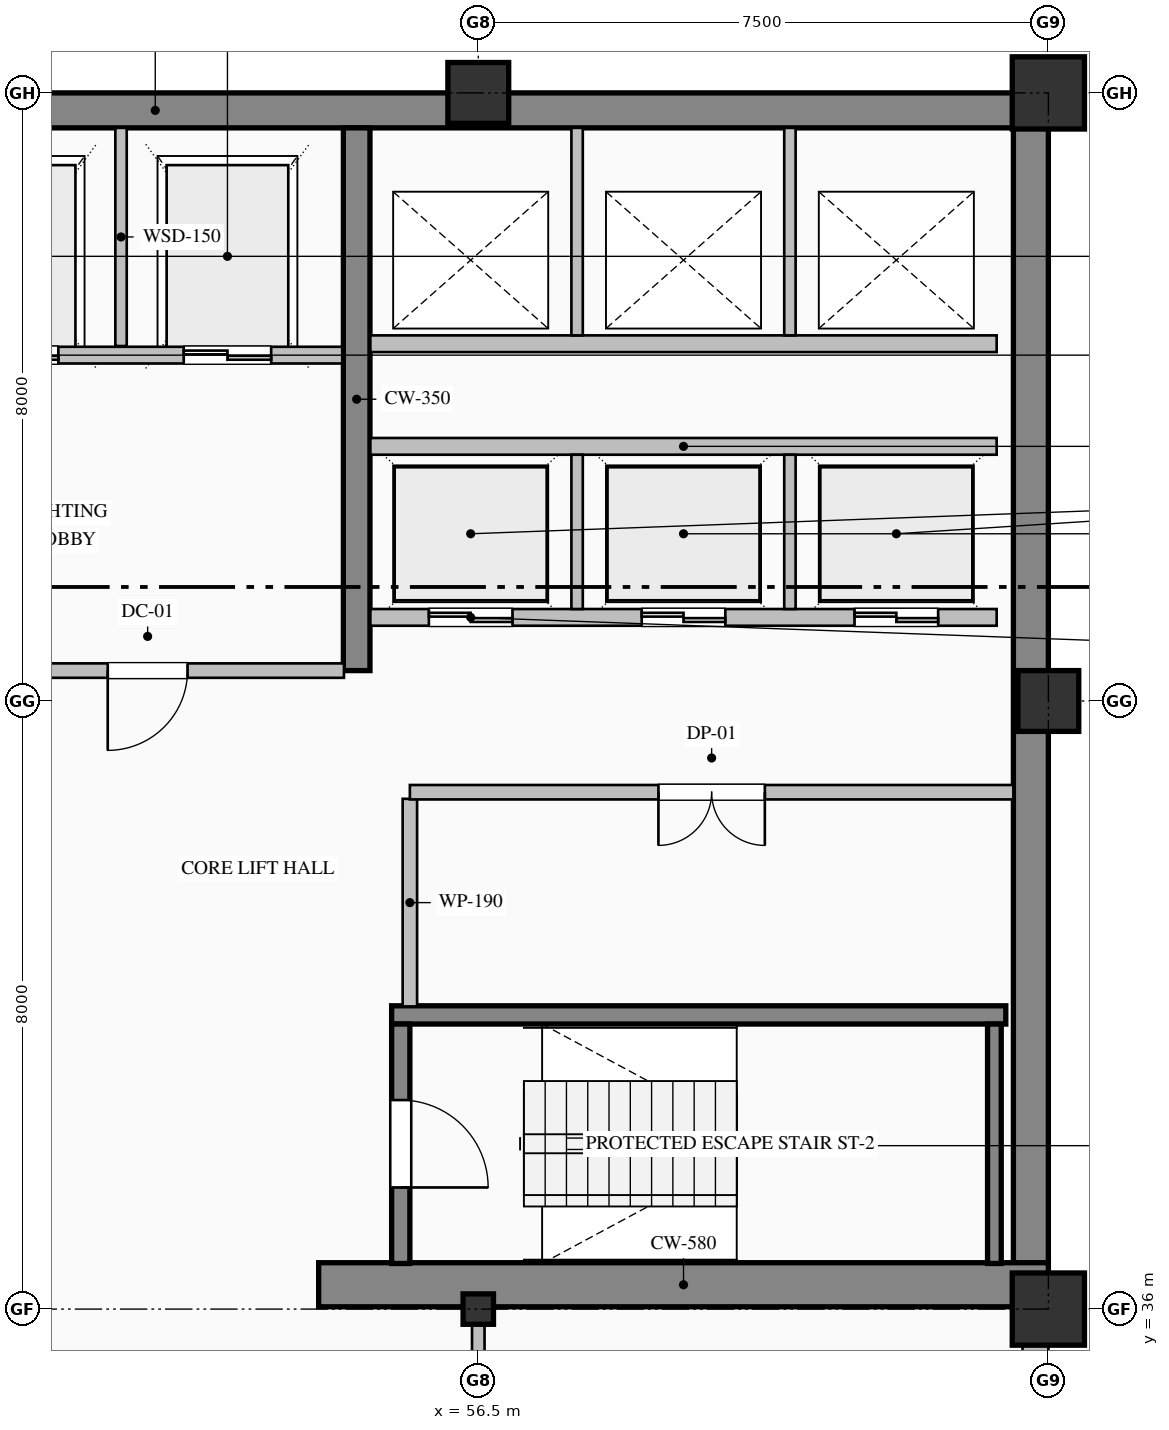
"""IFC4 building model, lengths in metres.
Left out: names, types, materials, properties, quantities, classifications, styles, units other than length and angle.
Written with IfcOpenShell. Run it as: python <this file> out.ifc"""

import sys

from ifc_helpers import new_model, si_unit, direction, frame, frame_2d, origin, origin_2d, place, context, subcontext, project, spatial, rectangle, hollow_rectangle, i_section, extrude, element, fill, save


model = new_model("IFC4")
c1 = context("Model", 3, precision=1e-05, world=origin(), true_north=direction((0.0, 1.0)))
c2 = subcontext(c1, "Body", "Model", "MODEL_VIEW")
j1 = project(units=[si_unit("LENGTHUNIT", "METRE"), si_unit("PLANEANGLEUNIT", "RADIAN")], contexts=[c1])
p1 = place(None, origin())
s1 = spatial("IfcSite", under=j1, at=p1, CompositionType="ELEMENT")
p2 = place(p1, origin())
s2 = spatial("IfcBuilding", under=s1, at=p2, CompositionType="ELEMENT")
p3 = place(p2, frame((0.0, 0.0, 221.8)))
s3 = spatial("IfcBuildingStorey", under=s2, at=p3, CompositionType="ELEMENT", Elevation=221.8)
p4 = place(p3, frame((40.5, 51.77, 0.0), z_axis=(0.0, 0.0, 1.0), x_axis=(1.0, 0.0, 0.0)))
e1 = element("IfcWall", 1, at=p4, inside=s3, PredefinedType="SHEAR", context=c2, shape_type="SweptSolid", body=[
    extrude(rectangle(XDim=23.5, YDim=0.46, at=frame_2d((11.75, 0.0))), origin(), (0.0, 0.0, 1.0), 3.775),
])
p5 = place(p3, frame((63.77, 36.32, 0.0), z_axis=(0.0, 0.0, 1.0), x_axis=(0.0, 1.0, 0.0)))
e2 = element("IfcWall", 2, at=p5, inside=s3, PredefinedType="SHEAR", context=c2, shape_type="SweptSolid", body=[
    extrude(rectangle(XDim=15.22, YDim=0.46, at=frame_2d((7.61, 0.0))), origin(), (0.0, 0.0, 1.0), 3.775),
])
p6 = place(p3, frame((54.4, 36.32, 0.0), z_axis=(0.0, 0.0, 1.0), x_axis=(1.0, 0.0, 0.0)))
e3 = element("IfcWall", 3, at=p6, inside=s3, PredefinedType="SHEAR", context=c2, shape_type="SweptSolid", body=[
    extrude(rectangle(XDim=9.6, YDim=0.58, at=frame_2d((4.8, 0.0))), origin(), (0.0, 0.0, 1.0), 4.0),
])
p7 = place(p3, frame((54.9, 44.4, 0.0), z_axis=(0.0, 0.0, 1.0), x_axis=(0.0, 1.0, 0.0)))
e4 = element("IfcWall", 4, at=p7, inside=s3, PredefinedType="SHEAR", context=c2, shape_type="SweptSolid", body=[
    extrude(rectangle(XDim=7.14, YDim=0.35, at=frame_2d((3.57, 0.0))), origin(), (0.0, 0.0, 1.0), 3.775),
])
p8 = place(p3, frame((56.5, 36.0, 0.0), z_axis=(0.0, 0.0, 1.0), x_axis=(1.0, 0.0, 0.0)))
e5 = element("IfcColumn", 5, at=p8, inside=s3, PredefinedType="COLUMN", context=c2, shape_type="SweptSolid", body=[
    extrude(i_section(OverallWidth=0.4, OverallDepth=0.4, WebThickness=0.013, FlangeThickness=0.021, FilletRadius=0.022, at=origin_2d()), origin(), (0.0, 0.0, 1.0), 4.0),
])
p9 = place(p3, frame((56.5, 52.0, 0.0), z_axis=(0.0, 0.0, 1.0), x_axis=(1.0, 0.0, 0.0)))
e6 = element("IfcColumn", 6, at=p9, inside=s3, PredefinedType="COLUMN", context=c2, shape_type="SweptSolid", body=[
    extrude(hollow_rectangle(XDim=0.8, YDim=0.8, WallThickness=0.032, at=origin_2d()), origin(), (0.0, 0.0, 1.0), 4.0),
])
p10 = place(p3, frame((64.0, 36.0, 0.0), z_axis=(0.0, 0.0, 1.0), x_axis=(1.0, 0.0, 0.0)))
e7 = element("IfcColumn", 7, at=p10, inside=s3, PredefinedType="COLUMN", context=c2, shape_type="SweptSolid", body=[
    extrude(hollow_rectangle(XDim=0.95, YDim=0.95, WallThickness=0.036, at=origin_2d()), origin(), (0.0, 0.0, 1.0), 4.0),
])
p11 = place(p3, frame((64.0, 44.0, 0.0), z_axis=(0.0, 0.0, 1.0), x_axis=(1.0, 0.0, 0.0)))
e8 = element("IfcColumn", 8, at=p11, inside=s3, PredefinedType="COLUMN", context=c2, shape_type="SweptSolid", body=[
    extrude(hollow_rectangle(XDim=0.8, YDim=0.8, WallThickness=0.032, at=origin_2d()), origin(), (0.0, 0.0, 1.0), 4.0),
])
p12 = place(p3, frame((64.0, 52.0, 0.0), z_axis=(0.0, 0.0, 1.0), x_axis=(1.0, 0.0, 0.0)))
e9 = element("IfcColumn", 9, at=p12, inside=s3, PredefinedType="COLUMN", context=c2, shape_type="SweptSolid", body=[
    extrude(hollow_rectangle(XDim=0.95, YDim=0.95, WallThickness=0.036, at=origin_2d()), origin(), (0.0, 0.0, 1.0), 4.0),
])
p13 = place(p3, frame((63.83, 36.05, 0.0), z_axis=(0.0, 0.0, 1.0), x_axis=(0.0, -1.0, 0.0)))
e10 = element("IfcWall", 10, at=p13, inside=s3, PredefinedType="SOLIDWALL", context=c2, shape_type="SweptSolid", body=[
    extrude(rectangle(XDim=19.55, YDim=0.34, at=frame_2d((9.775, 0.0))), origin(), (0.0, 0.0, 1.0), 3.325),
])
p14 = place(p13, frame((2.85, 0.0, 0.7)))
e11 = element("IfcOpeningElement", 11, at=p14, cuts=e10, PredefinedType="OPENING", context=c2, shape_type="SweptSolid", body=[
    extrude(rectangle(XDim=1.5, YDim=2.4, at=frame_2d((0.75, 1.2))), frame((0.0, 0.18, 0.0), z_axis=(0.0, -1.0, 0.0), x_axis=(1.0, 0.0, 0.0)), (0.0, 0.0, 1.0), 0.36),
])
p15 = place(p13, frame((10.125, 0.0, 0.9)))
e12 = element("IfcOpeningElement", 12, at=p15, cuts=e10, PredefinedType="OPENING", context=c2, shape_type="SweptSolid", body=[
    extrude(rectangle(XDim=1.35, YDim=1.85, at=frame_2d((0.675, 0.925))), frame((0.0, 0.18, 0.0), z_axis=(0.0, -1.0, 0.0), x_axis=(1.0, 0.0, 0.0)), (0.0, 0.0, 1.0), 0.36),
])
p16 = place(p13, frame((13.65, 0.0, 0.7)))
e13 = element("IfcOpeningElement", 13, at=p16, cuts=e10, PredefinedType="OPENING", context=c2, shape_type="SweptSolid", body=[
    extrude(rectangle(XDim=1.5, YDim=2.4, at=frame_2d((0.75, 1.2))), frame((0.0, 0.18, 0.0), z_axis=(0.0, -1.0, 0.0), x_axis=(1.0, 0.0, 0.0)), (0.0, 0.0, 1.0), 0.36),
])
p17 = place(p3, frame((55.36, 39.87, 0.0), z_axis=(0.0, 0.0, 1.0), x_axis=(1.0, 0.0, 0.0)))
e14 = element("IfcWall", 14, at=p17, inside=s3, PredefinedType="SOLIDWALL", context=c2, shape_type="SweptSolid", body=[
    extrude(rectangle(XDim=8.08, YDim=0.24, at=frame_2d((4.04, 0.0))), origin(), (0.0, 0.0, 1.0), 4.0),
])
p18 = place(p3, frame((55.48, 39.75, 0.0), z_axis=(0.0, 0.0, 1.0), x_axis=(0.0, -1.0, 0.0)))
e15 = element("IfcWall", 15, at=p18, inside=s3, PredefinedType="SOLIDWALL", context=c2, shape_type="SweptSolid", body=[
    extrude(rectangle(XDim=3.15, YDim=0.24, at=frame_2d((1.575, 0.0))), origin(), (0.0, 0.0, 1.0), 4.0),
])
p19 = place(p18, frame((1.0, 0.0, 0.0)))
e16 = element("IfcOpeningElement", 16, at=p19, cuts=e15, PredefinedType="OPENING", context=c2, shape_type="SweptSolid", body=[
    extrude(rectangle(XDim=1.15, YDim=2.2, at=frame_2d((0.575, 1.1))), frame((0.0, 0.13, 0.0), z_axis=(0.0, -1.0, 0.0), x_axis=(1.0, 0.0, 0.0)), (0.0, 0.0, 1.0), 0.26),
])
p20 = place(p3, frame((63.29, 36.6, 0.0), z_axis=(0.0, 0.0, 1.0), x_axis=(0.0, 1.0, 0.0)))
e17 = element("IfcWall", 17, at=p20, inside=s3, PredefinedType="SOLIDWALL", context=c2, shape_type="SweptSolid", body=[
    extrude(rectangle(XDim=3.15, YDim=0.18, at=frame_2d((1.575, 0.0))), origin(), (0.0, 0.0, 1.0), 4.0),
])
p21 = place(p3, frame((54.71, 48.55, 0.0), z_axis=(0.0, 0.0, 1.0), x_axis=(-1.0, 0.0, 0.0)))
e18 = element("IfcWall", 18, at=p21, inside=s3, PredefinedType="PARTITIONING", context=c2, shape_type="SweptSolid", body=[
    extrude(rectangle(XDim=5.12, YDim=0.22, at=frame_2d((2.56, 0.0))), origin(), (0.0, 0.0, 1.0), 3.775),
])
p22 = place(p21, frame((3.735, 0.0, 0.0)))
e19 = element("IfcOpeningElement", 19, at=p22, cuts=e18, PredefinedType="OPENING", context=c2, shape_type="SweptSolid", body=[
    extrude(rectangle(XDim=1.15, YDim=2.2, at=frame_2d((0.575, 1.1))), frame((0.0, 0.12, 0.0), z_axis=(0.0, -1.0, 0.0), x_axis=(1.0, 0.0, 0.0)), (0.0, 0.0, 1.0), 0.24),
])
p23 = place(p21, frame((0.935, 0.0, 0.0)))
e20 = element("IfcOpeningElement", 20, at=p23, cuts=e18, PredefinedType="OPENING", context=c2, shape_type="SweptSolid", body=[
    extrude(rectangle(XDim=1.15, YDim=2.2, at=frame_2d((0.575, 1.1))), frame((0.0, 0.12, 0.0), z_axis=(0.0, -1.0, 0.0), x_axis=(1.0, 0.0, 0.0)), (0.0, 0.0, 1.0), 0.24),
])
p24 = place(p3, frame((51.8, 48.67, 0.0), z_axis=(0.0, 0.0, 1.0), x_axis=(0.0, 1.0, 0.0)))
e21 = element("IfcWall", 21, at=p24, inside=s3, PredefinedType="PARTITIONING", context=c2, shape_type="SweptSolid", body=[
    extrude(rectangle(XDim=2.87, YDim=0.15, at=frame_2d((1.435, 0.0))), origin(), (0.0, 0.0, 1.0), 3.775),
])
p25 = place(p3, frame((63.32, 45.1, 0.0), z_axis=(0.0, 0.0, 1.0), x_axis=(-1.0, 0.0, 0.0)))
e22 = element("IfcWall", 22, at=p25, inside=s3, PredefinedType="PARTITIONING", context=c2, shape_type="SweptSolid", body=[
    extrude(rectangle(XDim=8.24, YDim=0.22, at=frame_2d((4.12, 0.0))), origin(), (0.0, 0.0, 1.0), 3.775),
])
p26 = place(p25, frame((6.37, 0.0, 0.0)))
e23 = element("IfcOpeningElement", 23, at=p26, cuts=e22, PredefinedType="OPENING", context=c2, shape_type="SweptSolid", body=[
    extrude(rectangle(XDim=1.1, YDim=2.2, at=frame_2d((0.55, 1.1))), frame((0.0, 0.12, 0.0), z_axis=(0.0, -1.0, 0.0), x_axis=(1.0, 0.0, 0.0)), (0.0, 0.0, 1.0), 0.24),
])
p27 = place(p25, frame((3.57, 0.0, 0.0)))
e24 = element("IfcOpeningElement", 24, at=p27, cuts=e22, PredefinedType="OPENING", context=c2, shape_type="SweptSolid", body=[
    extrude(rectangle(XDim=1.1, YDim=2.2, at=frame_2d((0.55, 1.1))), frame((0.0, 0.12, 0.0), z_axis=(0.0, -1.0, 0.0), x_axis=(1.0, 0.0, 0.0)), (0.0, 0.0, 1.0), 0.24),
])
p28 = place(p25, frame((0.77, 0.0, 0.0)))
e25 = element("IfcOpeningElement", 25, at=p28, cuts=e22, PredefinedType="OPENING", context=c2, shape_type="SweptSolid", body=[
    extrude(rectangle(XDim=1.1, YDim=2.2, at=frame_2d((0.55, 1.1))), frame((0.0, 0.12, 0.0), z_axis=(0.0, -1.0, 0.0), x_axis=(1.0, 0.0, 0.0)), (0.0, 0.0, 1.0), 0.24),
])
p29 = place(p3, frame((55.08, 47.35, 0.0), z_axis=(0.0, 0.0, 1.0), x_axis=(1.0, 0.0, 0.0)))
e26 = element("IfcWall", 26, at=p29, inside=s3, PredefinedType="PARTITIONING", context=c2, shape_type="SweptSolid", body=[
    extrude(rectangle(XDim=8.24, YDim=0.22, at=frame_2d((4.12, 0.0))), origin(), (0.0, 0.0, 1.0), 3.775),
])
for number, where, z_axis, x_axis in (
    (27, (57.8, 45.21, 0.0), (0.0, 0.0, 1.0), (0.0, 1.0, 0.0)),
    (28, (60.6, 45.21, 0.0), (0.0, 0.0, 1.0), (0.0, 1.0, 0.0)),
):
    element("IfcWall", number, at=place(p3, frame(where, z_axis=z_axis, x_axis=x_axis)), inside=s3, PredefinedType="PARTITIONING", context=c2, shape_type="SweptSolid", body=[
        extrude(rectangle(XDim=2.03, YDim=0.15, at=frame_2d((1.015, 0.0))), origin(), (0.0, 0.0, 1.0), 3.775),
    ])
p30 = place(p3, frame((63.32, 48.7, 0.0), z_axis=(0.0, 0.0, 1.0), x_axis=(-1.0, 0.0, 0.0)))
e29 = element("IfcWall", 29, at=p30, inside=s3, PredefinedType="PARTITIONING", context=c2, shape_type="SweptSolid", body=[
    extrude(rectangle(XDim=8.24, YDim=0.22, at=frame_2d((4.12, 0.0))), origin(), (0.0, 0.0, 1.0), 3.775),
])
for number, where, z_axis, x_axis in (
    (30, (57.8, 48.81, 0.0), (0.0, 0.0, 1.0), (0.0, 1.0, 0.0)),
    (31, (60.6, 48.81, 0.0), (0.0, 0.0, 1.0), (0.0, 1.0, 0.0)),
):
    element("IfcWall", number, at=place(p3, frame(where, z_axis=z_axis, x_axis=x_axis)), inside=s3, PredefinedType="PARTITIONING", context=c2, shape_type="SweptSolid", body=[
        extrude(rectangle(XDim=2.73, YDim=0.15, at=frame_2d((1.365, 0.0))), origin(), (0.0, 0.0, 1.0), 3.775),
    ])
p31 = place(p3, frame((54.733, 44.4, 0.0), z_axis=(0.0, 0.0, 1.0), x_axis=(-1.0, 0.0, 0.0)))
e32 = element("IfcWall", 32, at=p31, inside=s3, PredefinedType="PARTITIONING", context=c2, shape_type="SweptSolid", body=[
    extrude(rectangle(XDim=5.166, YDim=0.19, at=frame_2d((2.583, 0.0))), origin(), (0.0, 0.0, 1.0), 3.775),
])
p32 = place(p31, frame((2.058, 0.0, 0.0)))
e33 = element("IfcOpeningElement", 33, at=p32, cuts=e32, PredefinedType="OPENING", context=c2, shape_type="SweptSolid", body=[
    extrude(rectangle(XDim=1.05, YDim=2.15, at=frame_2d((0.525, 1.075))), frame((0.0, 0.105, 0.0), z_axis=(0.0, -1.0, 0.0), x_axis=(1.0, 0.0, 0.0)), (0.0, 0.0, 1.0), 0.21),
])
p33 = place(p3, frame((55.6, 42.713, 0.0), z_axis=(0.0, 0.0, 1.0), x_axis=(0.0, -1.0, 0.0)))
e34 = element("IfcWall", 34, at=p33, inside=s3, PredefinedType="PARTITIONING", context=c2, shape_type="SweptSolid", body=[
    extrude(rectangle(XDim=2.731, YDim=0.19, at=frame_2d((1.365, 0.0))), origin(), (0.0, 0.0, 1.0), 3.775),
])
p34 = place(p3, frame((63.54, 42.8, 0.0), z_axis=(0.0, 0.0, 1.0), x_axis=(-1.0, 0.0, 0.0)))
e35 = element("IfcWall", 35, at=p34, inside=s3, PredefinedType="PARTITIONING", context=c2, shape_type="SweptSolid", body=[
    extrude(rectangle(XDim=7.94, YDim=0.19, at=frame_2d((3.97, 0.0))), origin(), (0.0, 0.0, 1.0), 3.775),
])
p35 = place(p34, frame((3.27, 0.0, 0.0)))
e36 = element("IfcOpeningElement", 36, at=p35, cuts=e35, PredefinedType="OPENING", context=c2, shape_type="SweptSolid", body=[
    extrude(rectangle(XDim=1.4, YDim=2.25, at=frame_2d((0.7, 1.125))), frame((0.0, 0.105, 0.0), z_axis=(0.0, -1.0, 0.0), x_axis=(1.0, 0.0, 0.0)), (0.0, 0.0, 1.0), 0.21),
])
p36 = place(p3, frame((56.5, 36.0, 0.0), z_axis=(0.0, 0.0, 1.0), x_axis=(0.0, -1.0, 0.0)))
e37 = element("IfcWall", 37, at=p36, inside=s3, PredefinedType="PARTITIONING", context=c2, shape_type="SweptSolid", body=[
    extrude(rectangle(XDim=5.525, YDim=0.165, at=frame_2d((2.763, 0.0))), origin(), (0.0, 0.0, 1.0), 3.179),
])
p37 = place(p19, origin())
e38 = element("IfcDoor", 38, at=p37, inside=s3, OperationType="SINGLE_SWING_RIGHT", PredefinedType="DOOR", context=c2, shape_type="SweptSolid", body=[
    extrude(rectangle(XDim=1.15, YDim=2.2, at=frame_2d((0.575, 1.1))), frame((0.0, 0.025, 0.0), z_axis=(0.0, -1.0, 0.0), x_axis=(1.0, 0.0, 0.0)), (0.0, 0.0, 1.0), 0.05),
])
fill(e16, e38)
p38 = place(p22, origin())
e39 = element("IfcDoor", 39, at=p38, inside=s3, OperationType="DOUBLE_DOOR_SLIDING", PredefinedType="DOOR", context=c2, shape_type="SweptSolid", body=[
    extrude(rectangle(XDim=1.15, YDim=2.2, at=frame_2d((0.575, 1.1))), frame((0.0, 0.025, 0.0), z_axis=(0.0, -1.0, 0.0), x_axis=(1.0, 0.0, 0.0)), (0.0, 0.0, 1.0), 0.05),
])
fill(e19, e39)
p39 = place(p23, origin())
e40 = element("IfcDoor", 40, at=p39, inside=s3, OperationType="DOUBLE_DOOR_SLIDING", PredefinedType="DOOR", context=c2, shape_type="SweptSolid", body=[
    extrude(rectangle(XDim=1.15, YDim=2.2, at=frame_2d((0.575, 1.1))), frame((0.0, 0.025, 0.0), z_axis=(0.0, -1.0, 0.0), x_axis=(1.0, 0.0, 0.0)), (0.0, 0.0, 1.0), 0.05),
])
fill(e20, e40)
p40 = place(p26, origin())
e41 = element("IfcDoor", 41, at=p40, inside=s3, OperationType="DOUBLE_DOOR_SLIDING", PredefinedType="DOOR", context=c2, shape_type="SweptSolid", body=[
    extrude(rectangle(XDim=1.1, YDim=2.2, at=frame_2d((0.55, 1.1))), frame((0.0, 0.025, 0.0), z_axis=(0.0, -1.0, 0.0), x_axis=(1.0, 0.0, 0.0)), (0.0, 0.0, 1.0), 0.05),
])
fill(e23, e41)
p41 = place(p27, origin())
e42 = element("IfcDoor", 42, at=p41, inside=s3, OperationType="DOUBLE_DOOR_SLIDING", PredefinedType="DOOR", context=c2, shape_type="SweptSolid", body=[
    extrude(rectangle(XDim=1.1, YDim=2.2, at=frame_2d((0.55, 1.1))), frame((0.0, 0.025, 0.0), z_axis=(0.0, -1.0, 0.0), x_axis=(1.0, 0.0, 0.0)), (0.0, 0.0, 1.0), 0.05),
])
fill(e24, e42)
p42 = place(p28, origin())
e43 = element("IfcDoor", 43, at=p42, inside=s3, OperationType="DOUBLE_DOOR_SLIDING", PredefinedType="DOOR", context=c2, shape_type="SweptSolid", body=[
    extrude(rectangle(XDim=1.1, YDim=2.2, at=frame_2d((0.55, 1.1))), frame((0.0, 0.025, 0.0), z_axis=(0.0, -1.0, 0.0), x_axis=(1.0, 0.0, 0.0)), (0.0, 0.0, 1.0), 0.05),
])
fill(e25, e43)
p43 = place(p32, origin())
e44 = element("IfcDoor", 44, at=p43, inside=s3, OperationType="SINGLE_SWING_RIGHT", PredefinedType="DOOR", context=c2, shape_type="SweptSolid", body=[
    extrude(rectangle(XDim=1.05, YDim=2.15, at=frame_2d((0.525, 1.075))), frame((0.0, 0.025, 0.0), z_axis=(0.0, -1.0, 0.0), x_axis=(1.0, 0.0, 0.0)), (0.0, 0.0, 1.0), 0.05),
])
fill(e33, e44)
p44 = place(p35, origin())
e45 = element("IfcDoor", 45, at=p44, inside=s3, OperationType="DOUBLE_DOOR_SINGLE_SWING", PredefinedType="DOOR", context=c2, shape_type="SweptSolid", body=[
    extrude(rectangle(XDim=1.4, YDim=2.25, at=frame_2d((0.7, 1.125))), frame((0.0, 0.025, 0.0), z_axis=(0.0, -1.0, 0.0), x_axis=(1.0, 0.0, 0.0)), (0.0, 0.0, 1.0), 0.05),
])
fill(e36, e45)
save(model, sys.argv[1])
